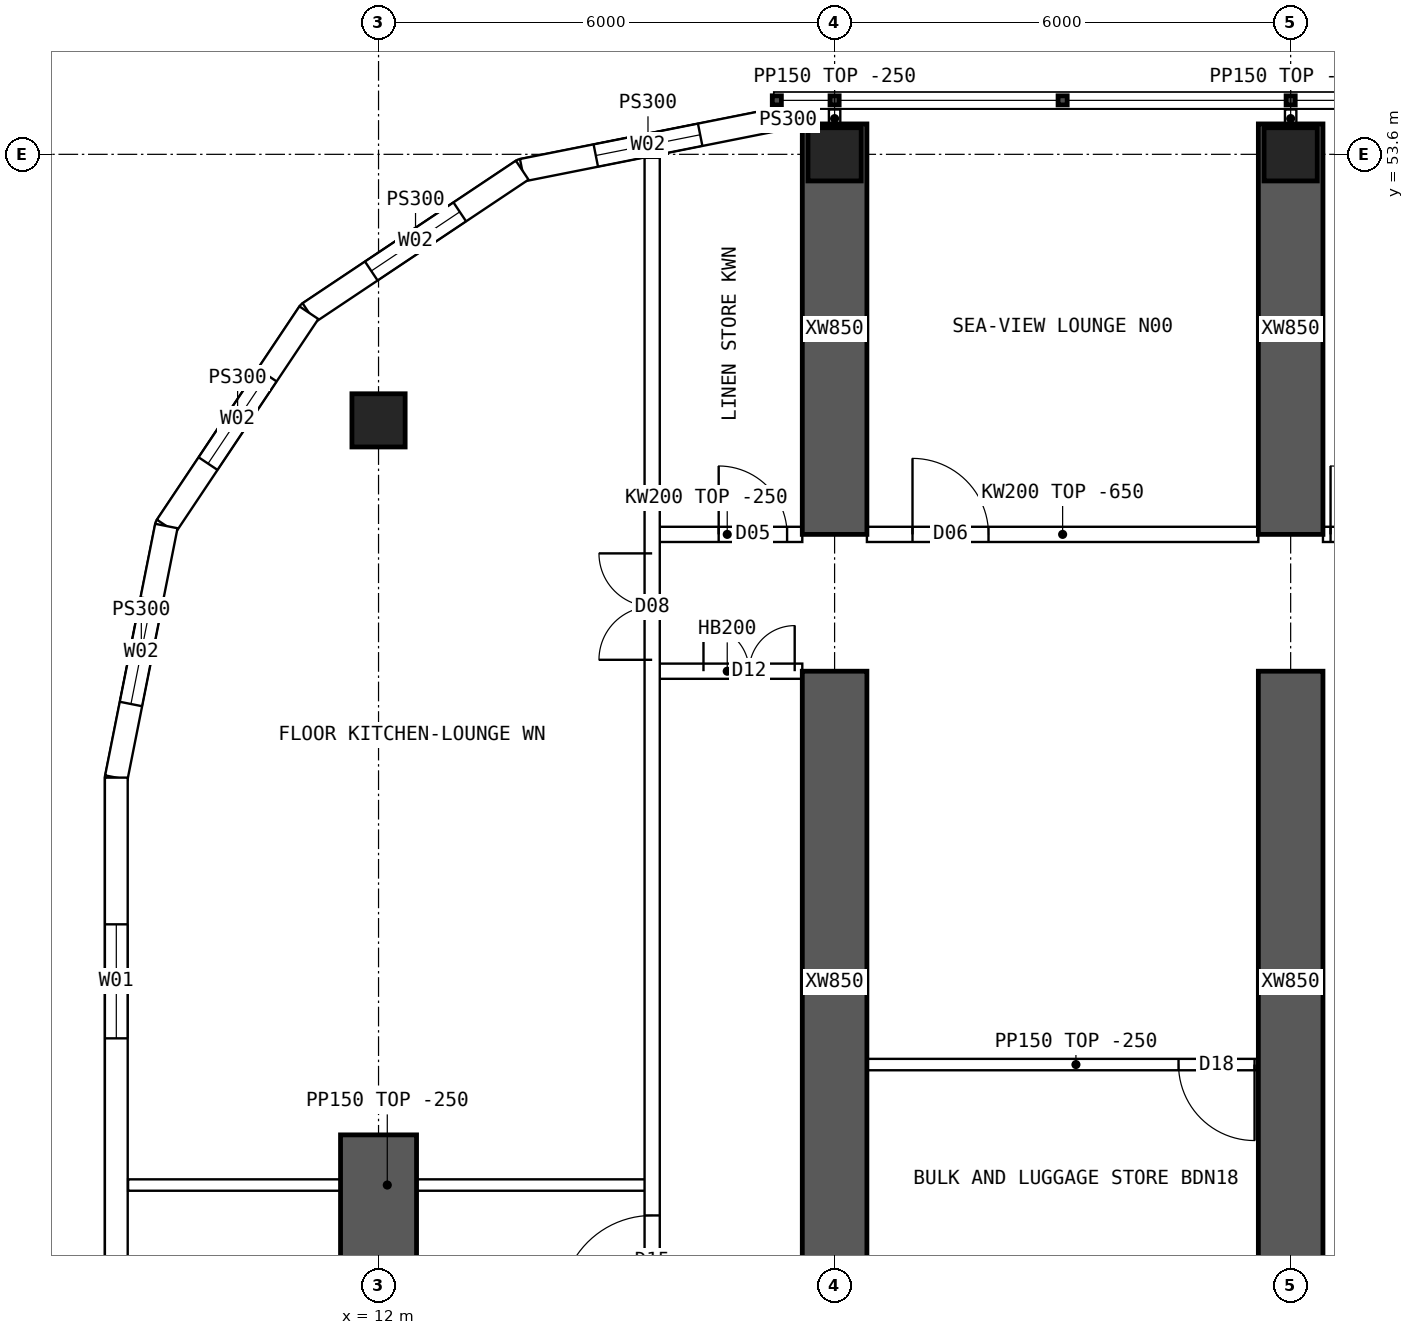
"""IFC4 building model, lengths in metres.
Left out: names, types, materials, properties, quantities, classifications, styles, units other than length and angle.
Written with IfcOpenShell. Run it as: python <this file> out.ifc"""

import sys

from ifc_helpers import new_model, si_unit, direction, frame, frame_2d, origin, origin_2d, place, context, subcontext, project, spatial, polyline, rectangle, hollow_rectangle, outline, extrude, element, fill, save


model = new_model("IFC4")
c1 = context("Model", 3, precision=1e-05, world=origin(), true_north=direction((0.0, 1.0)))
c2 = subcontext(c1, "Body", "Model", "MODEL_VIEW")
j1 = project(units=[si_unit("LENGTHUNIT", "METRE"), si_unit("PLANEANGLEUNIT", "RADIAN")], contexts=[c1])
p1 = place(None, origin())
s1 = spatial("IfcSite", under=j1, at=p1, CompositionType="ELEMENT")
p2 = place(p1, origin())
s2 = spatial("IfcBuilding", under=s1, at=p2, CompositionType="ELEMENT")
p3 = place(p2, frame((0.0, 0.0, 171.1)))
s3 = spatial("IfcBuildingStorey", under=s2, at=p3, CompositionType="ELEMENT", Elevation=171.1)
for number, where, z_axis, x_axis in (
    (1, (18.0, 53.6, 0.0), (0.0, 0.0, 1.0), (1.0, 0.0, 0.0)),
    (2, (24.0, 53.6, 0.0), (0.0, 0.0, 1.0), (1.0, 0.0, 0.0)),
    (3, (12.0, 50.1, 0.0), (0.0, 0.0, 1.0), (1.0, 0.0, 0.0)),
):
    element("IfcColumn", number, at=place(p3, frame(where, z_axis=z_axis, x_axis=x_axis)), inside=s3, PredefinedType="COLUMN", context=c2, shape_type="SweptSolid", body=[
        extrude(hollow_rectangle(XDim=0.7, YDim=0.7, WallThickness=0.07, at=origin_2d()), origin(), (0.0, 0.0, 1.0), 3.75),
    ])
p4 = place(p3, frame((12.0, 35.7, 0.0), z_axis=(0.0, 0.0, 1.0), x_axis=(0.0, 1.0, 0.0)))
e4 = element("IfcWall", 4, at=p4, inside=s3, PredefinedType="SHEAR", context=c2, shape_type="SweptSolid", body=[
    extrude(rectangle(XDim=5.0, YDim=1.0, at=frame_2d((2.5, 0.0))), origin(), (0.0, 0.0, 1.0), 3.75),
])
p5 = place(p3, frame((18.0, 48.6, 0.0), z_axis=(0.0, 0.0, 1.0), x_axis=(0.0, 1.0, 0.0)))
e5 = element("IfcWall", 5, at=p5, inside=s3, PredefinedType="SHEAR", context=c2, shape_type="SweptSolid", body=[
    extrude(rectangle(XDim=5.4, YDim=0.85, at=frame_2d((2.7, 0.0))), origin(), (0.0, 0.0, 1.0), 3.75),
])
p6 = place(p3, frame((18.0, 38.625, 0.0), z_axis=(0.0, 0.0, 1.0), x_axis=(0.0, 1.0, 0.0)))
e6 = element("IfcWall", 6, at=p6, inside=s3, PredefinedType="SHEAR", context=c2, shape_type="SweptSolid", body=[
    extrude(rectangle(XDim=8.175, YDim=0.85, at=frame_2d((4.087, 0.0))), origin(), (0.0, 0.0, 1.0), 3.75),
])
p7 = place(p3, frame((24.0, 48.6, 0.0), z_axis=(0.0, 0.0, 1.0), x_axis=(0.0, 1.0, 0.0)))
e7 = element("IfcWall", 7, at=p7, inside=s3, PredefinedType="SHEAR", context=c2, shape_type="SweptSolid", body=[
    extrude(rectangle(XDim=5.4, YDim=0.85, at=frame_2d((2.7, 0.0))), origin(), (0.0, 0.0, 1.0), 3.75),
])
p8 = place(p3, frame((24.0, 38.625, 0.0), z_axis=(0.0, 0.0, 1.0), x_axis=(0.0, 1.0, 0.0)))
e8 = element("IfcWall", 8, at=p8, inside=s3, PredefinedType="SHEAR", context=c2, shape_type="SweptSolid", body=[
    extrude(rectangle(XDim=8.175, YDim=0.85, at=frame_2d((4.087, 0.0))), origin(), (0.0, 0.0, 1.0), 3.75),
])
p9 = place(p3, frame((8.55, 45.4, 0.0), z_axis=(0.0, 0.0, 1.0), x_axis=(0.0, -1.0, 0.0)))
e9 = element("IfcWall", 9, at=p9, inside=s3, PredefinedType="SOLIDWALL", context=c2, shape_type="SweptSolid", body=[
    extrude(outline(polyline([(-0.015, -0.15), (26.815, -0.15), (26.785, 0.15), (0.015, 0.15), (-0.015, -0.15)])), origin(), (0.0, 0.0, 1.0), 3.5),
])
p10 = place(p9, frame((1.93, 0.0, 0.9)))
e10 = element("IfcOpeningElement", 10, at=p10, cuts=e9, PredefinedType="OPENING", context=c2, shape_type="SweptSolid", body=[
    extrude(rectangle(XDim=1.5, YDim=2.0, at=frame_2d((0.75, 1.0))), frame((0.0, 0.16, 0.0), z_axis=(0.0, -1.0, 0.0), x_axis=(1.0, 0.0, 0.0)), (0.0, 0.0, 1.0), 0.32),
])
p11 = place(p9, frame((7.29, 0.0, 0.9)))
e11 = element("IfcOpeningElement", 11, at=p11, cuts=e9, PredefinedType="OPENING", context=c2, shape_type="SweptSolid", body=[
    extrude(rectangle(XDim=1.5, YDim=2.0, at=frame_2d((0.75, 1.0))), frame((0.0, 0.16, 0.0), z_axis=(0.0, -1.0, 0.0), x_axis=(1.0, 0.0, 0.0)), (0.0, 0.0, 1.0), 0.32),
])
p12 = place(p9, frame((12.65, 0.0, 0.9)))
e12 = element("IfcOpeningElement", 12, at=p12, cuts=e9, PredefinedType="OPENING", context=c2, shape_type="SweptSolid", body=[
    extrude(rectangle(XDim=1.5, YDim=2.0, at=frame_2d((0.75, 1.0))), frame((0.0, 0.16, 0.0), z_axis=(0.0, -1.0, 0.0), x_axis=(1.0, 0.0, 0.0)), (0.0, 0.0, 1.0), 0.32),
])
p13 = place(p9, frame((18.01, 0.0, 0.9)))
e13 = element("IfcOpeningElement", 13, at=p13, cuts=e9, PredefinedType="OPENING", context=c2, shape_type="SweptSolid", body=[
    extrude(rectangle(XDim=1.5, YDim=2.0, at=frame_2d((0.75, 1.0))), frame((0.0, 0.16, 0.0), z_axis=(0.0, -1.0, 0.0), x_axis=(1.0, 0.0, 0.0)), (0.0, 0.0, 1.0), 0.32),
])
p14 = place(p9, frame((23.37, 0.0, 0.9)))
e14 = element("IfcOpeningElement", 14, at=p14, cuts=e9, PredefinedType="OPENING", context=c2, shape_type="SweptSolid", body=[
    extrude(rectangle(XDim=1.5, YDim=2.0, at=frame_2d((0.75, 1.0))), frame((0.0, 0.16, 0.0), z_axis=(0.0, -1.0, 0.0), x_axis=(1.0, 0.0, 0.0)), (0.0, 0.0, 1.0), 0.32),
])
p15 = place(p3, frame((17.2, 54.05, 0.0), z_axis=(0.0, 0.0, 1.0), x_axis=(-0.98078325777, -0.195100490205, 0.0)))
e15 = element("IfcWall", 15, at=p15, inside=s3, PredefinedType="SOLIDWALL", context=c2, shape_type="SweptSolid", body=[
    extrude(outline(polyline([(-0.03, -0.15), (3.405, -0.15), (3.345, 0.15), (0.03, 0.15), (-0.03, -0.15)])), origin(), (0.0, 0.0, 1.0), 3.5),
])
p16 = place(p15, frame((0.988, 0.0, 0.9)))
e16 = element("IfcOpeningElement", 16, at=p16, cuts=e15, PredefinedType="OPENING", context=c2, shape_type="SweptSolid", body=[
    extrude(rectangle(XDim=1.4, YDim=1.8, at=frame_2d((0.7, 0.9))), frame((0.0, 0.16, 0.0), z_axis=(0.0, -1.0, 0.0), x_axis=(1.0, 0.0, 0.0)), (0.0, 0.0, 1.0), 0.32),
])
p17 = place(p3, frame((13.89, 53.392, 0.0), z_axis=(0.0, 0.0, 1.0), x_axis=(-0.831493450887, -0.555534554399, 0.0)))
e17 = element("IfcWall", 17, at=p17, inside=s3, PredefinedType="SOLIDWALL", context=c2, shape_type="SweptSolid", body=[
    extrude(outline(polyline([(-0.03, -0.15), (3.405, -0.15), (3.345, 0.15), (0.03, 0.15), (-0.03, -0.15)])), origin(), (0.0, 0.0, 1.0), 3.5),
])
p18 = place(p17, frame((0.988, 0.0, 0.9)))
e18 = element("IfcOpeningElement", 18, at=p18, cuts=e17, PredefinedType="OPENING", context=c2, shape_type="SweptSolid", body=[
    extrude(rectangle(XDim=1.4, YDim=1.8, at=frame_2d((0.7, 0.9))), frame((0.0, 0.16, 0.0), z_axis=(0.0, -1.0, 0.0), x_axis=(1.0, 0.0, 0.0)), (0.0, 0.0, 1.0), 0.32),
])
p19 = place(p3, frame((11.083, 51.517, 0.0), z_axis=(0.0, 0.0, 1.0), x_axis=(-0.555534554399, -0.831493450887, 0.0)))
e19 = element("IfcWall", 19, at=p19, inside=s3, PredefinedType="SOLIDWALL", context=c2, shape_type="SweptSolid", body=[
    extrude(outline(polyline([(-0.03, -0.15), (3.405, -0.15), (3.345, 0.15), (0.03, 0.15), (-0.03, -0.15)])), origin(), (0.0, 0.0, 1.0), 3.5),
])
p20 = place(p19, frame((0.988, 0.0, 0.9)))
e20 = element("IfcOpeningElement", 20, at=p20, cuts=e19, PredefinedType="OPENING", context=c2, shape_type="SweptSolid", body=[
    extrude(rectangle(XDim=1.4, YDim=1.8, at=frame_2d((0.7, 0.9))), frame((0.0, 0.16, 0.0), z_axis=(0.0, -1.0, 0.0), x_axis=(1.0, 0.0, 0.0)), (0.0, 0.0, 1.0), 0.32),
])
p21 = place(p3, frame((9.208, 48.71, 0.0), z_axis=(0.0, 0.0, 1.0), x_axis=(-0.19508664885, -0.980786011034, 0.0)))
e21 = element("IfcWall", 21, at=p21, inside=s3, PredefinedType="SOLIDWALL", context=c2, shape_type="SweptSolid", body=[
    extrude(outline(polyline([(-0.03, -0.15), (3.39, -0.15), (3.36, 0.15), (0.03, 0.15), (-0.03, -0.15)])), origin(), (0.0, 0.0, 1.0), 3.5),
])
p22 = place(p21, frame((0.988, 0.0, 0.9)))
e22 = element("IfcOpeningElement", 22, at=p22, cuts=e21, PredefinedType="OPENING", context=c2, shape_type="SweptSolid", body=[
    extrude(rectangle(XDim=1.4, YDim=1.8, at=frame_2d((0.7, 0.9))), frame((0.0, 0.16, 0.0), z_axis=(0.0, -1.0, 0.0), x_axis=(1.0, 0.0, 0.0)), (0.0, 0.0, 1.0), 0.32),
])
p23 = place(p3, frame((17.2, 54.05, 0.0), z_axis=(0.0, 0.0, 1.0), x_axis=(1.0, 0.0, 0.0)))
e23 = element("IfcWall", 23, at=p23, inside=s3, PredefinedType="SOLIDWALL", context=c2, shape_type="SweptSolid", body=[
    extrude(rectangle(XDim=0.375, YDim=0.3, at=frame_2d((0.188, 0.0))), origin(), (0.0, 0.0, 1.0), 3.5),
])
p24 = place(p3, frame((15.6, 48.6, 0.0), z_axis=(0.0, 0.0, 1.0), x_axis=(1.0, 0.0, 0.0)))
e24 = element("IfcWall", 24, at=p24, inside=s3, PredefinedType="SOLIDWALL", context=c2, shape_type="SweptSolid", body=[
    extrude(rectangle(XDim=1.975, YDim=0.2, at=frame_2d((0.987, 0.0))), origin(), (0.0, 0.0, 1.0), 3.5),
])
p25 = place(p24, frame((0.875, 0.0, 0.0)))
e25 = element("IfcOpeningElement", 25, at=p25, cuts=e24, PredefinedType="OPENING", context=c2, shape_type="SweptSolid", body=[
    extrude(rectangle(XDim=0.9, YDim=2.1, at=frame_2d((0.45, 1.05))), frame((0.0, 0.11, 0.0), z_axis=(0.0, -1.0, 0.0), x_axis=(1.0, 0.0, 0.0)), (0.0, 0.0, 1.0), 0.22),
])
p26 = place(p3, frame((15.6, 46.8, 0.0), z_axis=(0.0, 0.0, 1.0), x_axis=(1.0, 0.0, 0.0)))
e26 = element("IfcWall", 26, at=p26, inside=s3, PredefinedType="SOLIDWALL", context=c2, shape_type="SweptSolid", body=[
    extrude(rectangle(XDim=1.975, YDim=0.2, at=frame_2d((0.987, 0.0))), origin(), (0.0, 0.0, 1.0), 3.5),
])
p27 = place(p26, frame((0.675, 0.0, 0.0)))
e27 = element("IfcOpeningElement", 27, at=p27, cuts=e26, PredefinedType="OPENING", context=c2, shape_type="SweptSolid", body=[
    extrude(rectangle(XDim=1.2, YDim=2.1, at=frame_2d((0.6, 1.05))), frame((0.0, 0.11, 0.0), z_axis=(0.0, -1.0, 0.0), x_axis=(1.0, 0.0, 0.0)), (0.0, 0.0, 1.0), 0.22),
])
p28 = place(p3, frame((18.425, 48.6, 0.0), z_axis=(0.0, 0.0, 1.0), x_axis=(1.0, 0.0, 0.0)))
e28 = element("IfcWall", 28, at=p28, inside=s3, PredefinedType="SOLIDWALL", context=c2, shape_type="SweptSolid", body=[
    extrude(outline(polyline([(0.0, 0.0), (5.15, 0.0), (5.15, 3.1), (0.0, 3.1), (0.0, 0.0)])), frame((0.0, 0.1, 0.0), z_axis=(0.0, -1.0, 0.0), x_axis=(1.0, 0.0, 0.0)), (0.0, 0.0, 1.0), 0.2),
])
p29 = place(p28, frame((0.6, 0.0, 0.0)))
e29 = element("IfcOpeningElement", 29, at=p29, cuts=e28, PredefinedType="OPENING", context=c2, shape_type="SweptSolid", body=[
    extrude(rectangle(XDim=1.0, YDim=2.1, at=frame_2d((0.5, 1.05))), frame((0.0, 0.11, 0.0), z_axis=(0.0, -1.0, 0.0), x_axis=(1.0, 0.0, 0.0)), (0.0, 0.0, 1.0), 0.22),
])
p30 = place(p3, frame((24.425, 48.6, 0.0), z_axis=(0.0, 0.0, 1.0), x_axis=(1.0, 0.0, 0.0)))
e30 = element("IfcWall", 30, at=p30, inside=s3, PredefinedType="SOLIDWALL", context=c2, shape_type="SweptSolid", body=[
    extrude(outline(polyline([(0.0, 0.0), (5.15, 0.0), (5.15, 3.1), (0.0, 3.1), (0.0, 0.0)])), frame((0.0, 0.1, 0.0), z_axis=(0.0, -1.0, 0.0), x_axis=(1.0, 0.0, 0.0)), (0.0, 0.0, 1.0), 0.2),
])
p31 = place(p30, frame((0.1, 0.0, 0.0)))
e31 = element("IfcOpeningElement", 31, at=p31, cuts=e30, PredefinedType="OPENING", context=c2, shape_type="SweptSolid", body=[
    extrude(rectangle(XDim=0.9, YDim=2.1, at=frame_2d((0.45, 1.05))), frame((0.0, 0.11, 0.0), z_axis=(0.0, -1.0, 0.0), x_axis=(1.0, 0.0, 0.0)), (0.0, 0.0, 1.0), 0.22),
])
p32 = place(p3, frame((23.925, 41.625, 0.0), z_axis=(0.0, 0.0, 1.0), x_axis=(-1.0, 0.0, 0.0)))
e32 = element("IfcWall", 32, at=p32, inside=s3, PredefinedType="PARTITIONING", context=c2, shape_type="SweptSolid", body=[
    extrude(rectangle(XDim=5.5, YDim=0.15, at=frame_2d((2.75, 0.0))), origin(), (0.0, 0.0, 1.0), 3.5),
])
p33 = place(p32, frame((0.4, 0.0, 0.0)))
e33 = element("IfcOpeningElement", 33, at=p33, cuts=e32, PredefinedType="OPENING", context=c2, shape_type="SweptSolid", body=[
    extrude(rectangle(XDim=1.0, YDim=2.1, at=frame_2d((0.5, 1.05))), frame((0.0, 0.085, 0.0), z_axis=(0.0, -1.0, 0.0), x_axis=(1.0, 0.0, 0.0)), (0.0, 0.0, 1.0), 0.17),
])
p34 = place(p3, frame((15.6, 10.446, 0.0), z_axis=(0.0, 0.0, 1.0), x_axis=(0.0, 1.0, 0.0)))
e34 = element("IfcWall", 34, at=p34, inside=s3, PredefinedType="SOLIDWALL", context=c2, shape_type="SweptSolid", body=[
    extrude(rectangle(XDim=43.107, YDim=0.2, at=frame_2d((21.554, 0.0))), origin(), (0.0, 0.0, 1.0), 3.5),
])
p35 = place(p34, frame((13.914, 0.0, 0.0)))
e35 = element("IfcOpeningElement", 35, at=p35, cuts=e34, PredefinedType="OPENING", context=c2, shape_type="SweptSolid", body=[
    extrude(rectangle(XDim=1.2, YDim=2.1, at=frame_2d((0.6, 1.05))), frame((0.0, 0.11, 0.0), z_axis=(0.0, -1.0, 0.0), x_axis=(1.0, 0.0, 0.0)), (0.0, 0.0, 1.0), 0.22),
])
p36 = place(p34, frame((27.994, 0.0, 0.0)))
e36 = element("IfcOpeningElement", 36, at=p36, cuts=e34, PredefinedType="OPENING", context=c2, shape_type="SweptSolid", body=[
    extrude(rectangle(XDim=1.2, YDim=2.1, at=frame_2d((0.6, 1.05))), frame((0.0, 0.11, 0.0), z_axis=(0.0, -1.0, 0.0), x_axis=(1.0, 0.0, 0.0)), (0.0, 0.0, 1.0), 0.22),
])
p37 = place(p34, frame((5.104, 0.0, 0.0)))
e37 = element("IfcOpeningElement", 37, at=p37, cuts=e34, PredefinedType="OPENING", context=c2, shape_type="SweptSolid", body=[
    extrude(rectangle(XDim=1.4, YDim=2.1, at=frame_2d((0.7, 1.05))), frame((0.0, 0.11, 0.0), z_axis=(0.0, -1.0, 0.0), x_axis=(1.0, 0.0, 0.0)), (0.0, 0.0, 1.0), 0.22),
])
p38 = place(p34, frame((36.504, 0.0, 0.0)))
e38 = element("IfcOpeningElement", 38, at=p38, cuts=e34, PredefinedType="OPENING", context=c2, shape_type="SweptSolid", body=[
    extrude(rectangle(XDim=1.4, YDim=2.1, at=frame_2d((0.7, 1.05))), frame((0.0, 0.11, 0.0), z_axis=(0.0, -1.0, 0.0), x_axis=(1.0, 0.0, 0.0)), (0.0, 0.0, 1.0), 0.22),
])
p39 = place(p3, frame((8.705, 40.04, 0.0), z_axis=(0.0, 0.0, 1.0), x_axis=(1.0, 0.0, 0.0)))
e39 = element("IfcWall", 39, at=p39, inside=s3, PredefinedType="PARTITIONING", context=c2, shape_type="SweptSolid", body=[
    extrude(rectangle(XDim=6.82, YDim=0.15, at=frame_2d((3.41, 0.0))), origin(), (0.0, 0.0, 1.0), 3.5),
])
for number, where, z_axis, x_axis in (
    (40, (18.0, 53.95, 0.0), (0.0, 0.0, 1.0), (0.0, 1.0, 0.0)),
    (41, (24.0, 53.95, 0.0), (0.0, 0.0, 1.0), (0.0, 1.0, 0.0)),
):
    element("IfcWall", number, at=place(p3, frame(where, z_axis=z_axis, x_axis=x_axis)), inside=s3, PredefinedType="PARTITIONING", context=c2, shape_type="SweptSolid", body=[
        extrude(rectangle(XDim=0.24, YDim=0.15, at=frame_2d((0.12, 0.0))), origin(), (0.0, 0.0, 1.0), 3.5),
    ])
p40 = place(p10, origin())
e42 = element("IfcWindow", 42, at=p40, inside=s3, PartitioningType="SINGLE_PANEL", PredefinedType="WINDOW", context=c2, shape_type="SweptSolid", body=[
    extrude(rectangle(XDim=1.5, YDim=2.0, at=frame_2d((0.75, 1.0))), frame((0.0, 0.03, 0.0), z_axis=(0.0, -1.0, 0.0), x_axis=(1.0, 0.0, 0.0)), (0.0, 0.0, 1.0), 0.06),
])
fill(e10, e42)
p41 = place(p16, origin())
e43 = element("IfcWindow", 43, at=p41, inside=s3, PartitioningType="SINGLE_PANEL", PredefinedType="WINDOW", context=c2, shape_type="SweptSolid", body=[
    extrude(rectangle(XDim=1.4, YDim=1.8, at=frame_2d((0.7, 0.9))), frame((0.0, 0.03, 0.0), z_axis=(0.0, -1.0, 0.0), x_axis=(1.0, 0.0, 0.0)), (0.0, 0.0, 1.0), 0.06),
])
fill(e16, e43)
p42 = place(p18, origin())
e44 = element("IfcWindow", 44, at=p42, inside=s3, PartitioningType="SINGLE_PANEL", PredefinedType="WINDOW", context=c2, shape_type="SweptSolid", body=[
    extrude(rectangle(XDim=1.4, YDim=1.8, at=frame_2d((0.7, 0.9))), frame((0.0, 0.03, 0.0), z_axis=(0.0, -1.0, 0.0), x_axis=(1.0, 0.0, 0.0)), (0.0, 0.0, 1.0), 0.06),
])
fill(e18, e44)
p43 = place(p20, origin())
e45 = element("IfcWindow", 45, at=p43, inside=s3, PartitioningType="SINGLE_PANEL", PredefinedType="WINDOW", context=c2, shape_type="SweptSolid", body=[
    extrude(rectangle(XDim=1.4, YDim=1.8, at=frame_2d((0.7, 0.9))), frame((0.0, 0.03, 0.0), z_axis=(0.0, -1.0, 0.0), x_axis=(1.0, 0.0, 0.0)), (0.0, 0.0, 1.0), 0.06),
])
fill(e20, e45)
p44 = place(p22, origin())
e46 = element("IfcWindow", 46, at=p44, inside=s3, PartitioningType="SINGLE_PANEL", PredefinedType="WINDOW", context=c2, shape_type="SweptSolid", body=[
    extrude(rectangle(XDim=1.4, YDim=1.8, at=frame_2d((0.7, 0.9))), frame((0.0, 0.03, 0.0), z_axis=(0.0, -1.0, 0.0), x_axis=(1.0, 0.0, 0.0)), (0.0, 0.0, 1.0), 0.06),
])
fill(e22, e46)
p45 = place(p27, origin())
e47 = element("IfcDoor", 47, at=p45, inside=s3, OperationType="DOUBLE_DOOR_SINGLE_SWING", PredefinedType="DOOR", context=c2, shape_type="SweptSolid", body=[
    extrude(rectangle(XDim=1.2, YDim=2.1, at=frame_2d((0.6, 1.05))), frame((0.0, 0.025, 0.0), z_axis=(0.0, -1.0, 0.0), x_axis=(1.0, 0.0, 0.0)), (0.0, 0.0, 1.0), 0.05),
])
fill(e27, e47)
p46 = place(p29, origin())
e48 = element("IfcDoor", 48, at=p46, inside=s3, OperationType="SINGLE_SWING_LEFT", PredefinedType="DOOR", context=c2, shape_type="SweptSolid", body=[
    extrude(rectangle(XDim=1.0, YDim=2.1, at=frame_2d((0.5, 1.05))), frame((0.0, 0.025, 0.0), z_axis=(0.0, -1.0, 0.0), x_axis=(1.0, 0.0, 0.0)), (0.0, 0.0, 1.0), 0.05),
])
fill(e29, e48)
p47 = place(p31, origin())
e49 = element("IfcDoor", 49, at=p47, inside=s3, OperationType="SINGLE_SWING_LEFT", PredefinedType="DOOR", context=c2, shape_type="SweptSolid", body=[
    extrude(rectangle(XDim=0.9, YDim=2.1, at=frame_2d((0.45, 1.05))), frame((0.0, 0.025, 0.0), z_axis=(0.0, -1.0, 0.0), x_axis=(1.0, 0.0, 0.0)), (0.0, 0.0, 1.0), 0.05),
])
fill(e31, e49)
p48 = place(p33, origin())
e50 = element("IfcDoor", 50, at=p48, inside=s3, OperationType="SINGLE_SWING_LEFT", PredefinedType="DOOR", context=c2, shape_type="SweptSolid", body=[
    extrude(rectangle(XDim=1.0, YDim=2.1, at=frame_2d((0.5, 1.05))), frame((0.0, 0.025, 0.0), z_axis=(0.0, -1.0, 0.0), x_axis=(1.0, 0.0, 0.0)), (0.0, 0.0, 1.0), 0.05),
])
fill(e33, e50)
p49 = place(p36, origin())
e51 = element("IfcDoor", 51, at=p49, inside=s3, OperationType="SINGLE_SWING_LEFT", PredefinedType="DOOR", context=c2, shape_type="SweptSolid", body=[
    extrude(rectangle(XDim=1.2, YDim=2.1, at=frame_2d((0.6, 1.05))), frame((0.0, 0.025, 0.0), z_axis=(0.0, -1.0, 0.0), x_axis=(1.0, 0.0, 0.0)), (0.0, 0.0, 1.0), 0.05),
])
fill(e36, e51)
p50 = place(p38, origin())
e52 = element("IfcDoor", 52, at=p50, inside=s3, OperationType="DOUBLE_DOOR_SINGLE_SWING", PredefinedType="DOOR", context=c2, shape_type="SweptSolid", body=[
    extrude(rectangle(XDim=1.4, YDim=2.1, at=frame_2d((0.7, 1.05))), frame((0.0, 0.025, 0.0), z_axis=(0.0, -1.0, 0.0), x_axis=(1.0, 0.0, 0.0)), (0.0, 0.0, 1.0), 0.05),
])
fill(e38, e52)
p51 = place(p25, origin())
e53 = element("IfcDoor", 53, at=p51, inside=s3, OperationType="SINGLE_SWING_LEFT", PredefinedType="DOOR", context=c2, shape_type="SweptSolid", body=[
    extrude(rectangle(XDim=0.9, YDim=2.1, at=frame_2d((0.45, 1.05))), frame((0.0, 0.025, 0.0), z_axis=(0.0, -1.0, 0.0), x_axis=(1.0, 0.0, 0.0)), (0.0, 0.0, 1.0), 0.05),
])
fill(e25, e53)
save(model, sys.argv[1])
